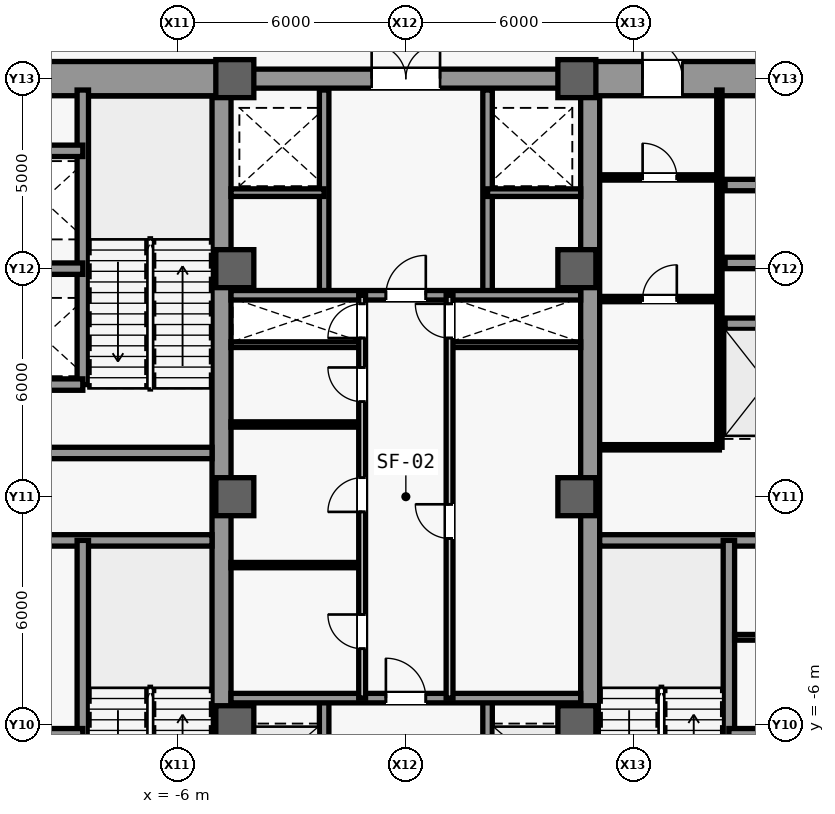
"""IFC4 building model, lengths in metres.
Left out: names, types, materials, properties, quantities, classifications, styles, units other than length and angle.
Written with IfcOpenShell. Run it as: python <this file> out.ifc"""

import sys

from ifc_helpers import new_model, si_unit, direction, frame, frame_2d, origin, origin_2d, place, context, subcontext, project, spatial, rectangle, extrude, source, transform, mapped, element, fill, save


model = new_model("IFC4")
c1 = context("Model", 3, precision=1e-05, world=origin(), true_north=direction((0.0, 1.0)))
c2 = subcontext(c1, "Body", "Model", "MODEL_VIEW")
j1 = project(units=[si_unit("LENGTHUNIT", "METRE"), si_unit("PLANEANGLEUNIT", "RADIAN")], contexts=[c1])
p1 = place(None, origin())
s1 = spatial("IfcSite", under=j1, at=p1, CompositionType="ELEMENT")
p2 = place(p1, origin())
s2 = spatial("IfcBuilding", under=s1, at=p2, CompositionType="ELEMENT")
p3 = place(p2, frame((0.0, 0.0, 12.0)))
s3 = spatial("IfcBuildingStorey", under=s2, at=p3, CompositionType="ELEMENT", Elevation=12.0)
m1 = source(origin(), c2, "Body", "SweptSolid", [
    extrude(rectangle(XDim=21.4, YDim=0.5, at=frame_2d((10.7, 0.0))), origin(), (0.0, 0.0, 1.0), 5.08),
])
for number, where, z_axis, x_axis in (
    (1, (-4.85, -10.7, 0.0), (0.0, 0.0, 1.0), (0.0, 1.0, 0.0)),
    (2, (4.85, -10.7, 0.0), (0.0, 0.0, 1.0), (0.0, 1.0, 0.0)),
):
    element("IfcWall", number, at=place(p3, frame(where, z_axis=z_axis, x_axis=x_axis)), inside=s3, PredefinedType="SHEAR", context=c2, shape_type="MappedRepresentation", body=[
        mapped(m1, transform((0.0, 0.0, 0.0), scale=1.0)),
    ])
m2 = source(origin(), c2, "Body", "SweptSolid", [
    extrude(rectangle(XDim=5.85, YDim=0.9, at=frame_2d((2.925, 0.0))), origin(), (0.0, 0.0, 1.0), 5.08),
])
p4 = place(p3, frame((-10.7, 11.0, 0.0), z_axis=(0.0, 0.0, 1.0), x_axis=(1.0, 0.0, 0.0)))
e3 = element("IfcWall", 3, at=p4, inside=s3, PredefinedType="SHEAR", context=c2, shape_type="MappedRepresentation", body=[
    mapped(m2, transform((0.0, 0.0, 0.0), scale=1.0)),
])
p5 = place(p3, frame((4.85, 11.0, 0.0), z_axis=(0.0, 0.0, 1.0), x_axis=(1.0, 0.0, 0.0)))
e4 = element("IfcWall", 4, at=p5, inside=s3, PredefinedType="SHEAR", context=c2, shape_type="MappedRepresentation", body=[
    mapped(m2, transform((0.0, 0.0, 0.0), scale=1.0)),
])
m3 = source(origin(), c2, "Body", "SweptSolid", [
    extrude(rectangle(XDim=1.05, YDim=2.2, at=frame_2d((0.525, 1.1))), frame((0.0, 0.46, 0.0), z_axis=(0.0, -1.0, 0.0), x_axis=(1.0, 0.0, 0.0)), (0.0, 0.0, 1.0), 0.92),
])
p6 = place(p5, frame((1.375, 0.0, 0.0)))
e5 = element("IfcOpeningElement", 5, at=p6, cuts=e4, PredefinedType="OPENING", context=c2, shape_type="MappedRepresentation", body=[
    mapped(m3, transform((0.0, 0.0, 0.0), scale=1.0)),
])
m4 = source(origin(), c2, "Body", "SweptSolid", [
    extrude(rectangle(XDim=5.6, YDim=0.3, at=frame_2d((2.8, 0.0))), origin(), (0.0, 0.0, 1.0), 5.08),
])
for number, where, z_axis, x_axis in (
    (6, (-10.7, -1.15, 0.0), (0.0, 0.0, 1.0), (1.0, 0.0, 0.0)),
    (7, (-10.7, 1.15, 0.0), (0.0, 0.0, 1.0), (1.0, 0.0, 0.0)),
    (8, (5.1, -1.15, 0.0), (0.0, 0.0, 1.0), (1.0, 0.0, 0.0)),
):
    element("IfcWall", number, at=place(p3, frame(where, z_axis=z_axis, x_axis=x_axis)), inside=s3, PredefinedType="SHEAR", context=c2, shape_type="MappedRepresentation", body=[
        mapped(m4, transform((0.0, 0.0, 0.0), scale=1.0)),
    ])
m5 = source(origin(), c2, "Body", "SweptSolid", [
    extrude(rectangle(XDim=9.2, YDim=0.5, at=frame_2d((4.6, 0.0))), origin(), (0.0, 0.0, 1.0), 5.08),
])
p7 = place(p3, frame((-4.6, 11.0, 0.0), z_axis=(0.0, 0.0, 1.0), x_axis=(1.0, 0.0, 0.0)))
e9 = element("IfcWall", 9, at=p7, inside=s3, PredefinedType="SHEAR", context=c2, shape_type="MappedRepresentation", body=[
    mapped(m5, transform((0.0, 0.0, 0.0), scale=1.0)),
])
m6 = source(origin(), c2, "Body", "SweptSolid", [
    extrude(rectangle(XDim=1.8, YDim=2.25, at=frame_2d((0.9, 1.125))), frame((0.0, 0.26, 0.0), z_axis=(0.0, -1.0, 0.0), x_axis=(1.0, 0.0, 0.0)), (0.0, 0.0, 1.0), 0.52),
])
p8 = place(p7, frame((3.7, 0.0, 0.0)))
e10 = element("IfcOpeningElement", 10, at=p8, cuts=e9, PredefinedType="OPENING", context=c2, shape_type="MappedRepresentation", body=[
    mapped(m6, transform((0.0, 0.0, 0.0), scale=1.0)),
])
m7 = source(origin(), c2, "Body", "SweptSolid", [
    extrude(rectangle(XDim=1.0, YDim=1.0, at=origin_2d()), origin(), (0.0, 0.0, 1.0), 5.4),
])
for number, where, z_axis, x_axis in (
    (11, (-4.5, -6.0, 0.0), (0.0, 0.0, 1.0), (1.0, 0.0, 0.0)),
    (12, (-4.5, 0.0, 0.0), (0.0, 0.0, 1.0), (1.0, 0.0, 0.0)),
    (13, (-4.5, 6.0, 0.0), (0.0, 0.0, 1.0), (1.0, 0.0, 0.0)),
    (14, (-4.5, 11.0, 0.0), (0.0, 0.0, 1.0), (1.0, 0.0, 0.0)),
    (15, (4.5, -6.0, 0.0), (0.0, 0.0, 1.0), (1.0, 0.0, 0.0)),
    (16, (4.5, 0.0, 0.0), (0.0, 0.0, 1.0), (1.0, 0.0, 0.0)),
    (17, (4.5, 6.0, 0.0), (0.0, 0.0, 1.0), (1.0, 0.0, 0.0)),
    (18, (4.5, 11.0, 0.0), (0.0, 0.0, 1.0), (1.0, 0.0, 0.0)),
):
    element("IfcColumn", number, at=place(p3, frame(where, z_axis=z_axis, x_axis=x_axis)), inside=s3, PredefinedType="COLUMN", context=c2, shape_type="MappedRepresentation", body=[
        mapped(m7, transform((0.0, 0.0, 0.0), scale=1.0)),
    ])
m8 = source(origin(), c2, "Body", "SweptSolid", [
    extrude(rectangle(XDim=7.8, YDim=0.3, at=frame_2d((3.9, 0.0))), origin(), (0.0, 0.0, 1.0), 5.08),
])
p9 = place(p3, frame((-8.5, -8.95, 0.0), z_axis=(0.0, 0.0, 1.0), x_axis=(0.0, 1.0, 0.0)))
e19 = element("IfcWall", 19, at=p9, inside=s3, PredefinedType="SHEAR", context=c2, shape_type="MappedRepresentation", body=[
    mapped(m8, transform((0.0, 0.0, 0.0), scale=1.0)),
])
m9 = source(origin(), c2, "Body", "SweptSolid", [
    extrude(rectangle(XDim=2.2, YDim=0.3, at=frame_2d((1.1, 0.0))), origin(), (0.0, 0.0, 1.0), 5.08),
])
p10 = place(p3, frame((-10.7, -6.25, 0.0), z_axis=(0.0, 0.0, 1.0), x_axis=(1.0, 0.0, 0.0)))
e20 = element("IfcWall", 20, at=p10, inside=s3, PredefinedType="SHEAR", context=c2, shape_type="MappedRepresentation", body=[
    mapped(m9, transform((0.0, 0.0, 0.0), scale=1.0)),
])
m10 = source(origin(), c2, "Body", "SweptSolid", [
    extrude(rectangle(XDim=7.75, YDim=0.3, at=frame_2d((3.875, 0.0))), origin(), (0.0, 0.0, 1.0), 5.08),
])
p11 = place(p3, frame((-8.5, 2.95, 0.0), z_axis=(0.0, 0.0, 1.0), x_axis=(0.0, 1.0, 0.0)))
e21 = element("IfcWall", 21, at=p11, inside=s3, PredefinedType="SHEAR", context=c2, shape_type="MappedRepresentation", body=[
    mapped(m10, transform((0.0, 0.0, 0.0), scale=1.0)),
])
for number, where, z_axis, x_axis in (
    (22, (-10.7, 2.95, 0.0), (0.0, 0.0, 1.0), (1.0, 0.0, 0.0)),
    (23, (-10.7, 6.0, 0.0), (0.0, 0.0, 1.0), (1.0, 0.0, 0.0)),
    (24, (-10.7, 9.1, 0.0), (0.0, 0.0, 1.0), (1.0, 0.0, 0.0)),
):
    element("IfcWall", number, at=place(p3, frame(where, z_axis=z_axis, x_axis=x_axis)), inside=s3, PredefinedType="SHEAR", context=c2, shape_type="MappedRepresentation", body=[
        mapped(m9, transform((0.0, 0.0, 0.0), scale=1.0)),
    ])
p12 = place(p3, frame((8.5, -8.95, 0.0), z_axis=(0.0, 0.0, 1.0), x_axis=(0.0, 1.0, 0.0)))
e25 = element("IfcWall", 25, at=p12, inside=s3, PredefinedType="SHEAR", context=c2, shape_type="MappedRepresentation", body=[
    mapped(m8, transform((0.0, 0.0, 0.0), scale=1.0)),
])
p13 = place(p3, frame((8.5, -6.25, 0.0), z_axis=(0.0, 0.0, 1.0), x_axis=(1.0, 0.0, 0.0)))
e26 = element("IfcWall", 26, at=p13, inside=s3, PredefinedType="SHEAR", context=c2, shape_type="MappedRepresentation", body=[
    mapped(m9, transform((0.0, 0.0, 0.0), scale=1.0)),
])
m11 = source(origin(), c2, "Body", "SweptSolid", [
    extrude(rectangle(XDim=2.3, YDim=0.3, at=frame_2d((1.15, 0.0))), origin(), (0.0, 0.0, 1.0), 5.08),
])
for number, where, z_axis, x_axis in (
    (27, (8.4, 4.55, 0.0), (0.0, 0.0, 1.0), (1.0, 0.0, 0.0)),
    (28, (8.4, 6.15, 0.0), (0.0, 0.0, 1.0), (1.0, 0.0, 0.0)),
    (29, (8.4, 8.2, 0.0), (0.0, 0.0, 1.0), (1.0, 0.0, 0.0)),
):
    element("IfcWall", number, at=place(p3, frame(where, z_axis=z_axis, x_axis=x_axis)), inside=s3, PredefinedType="SHEAR", context=c2, shape_type="MappedRepresentation", body=[
        mapped(m11, transform((0.0, 0.0, 0.0), scale=1.0)),
    ])
m12 = source(origin(), c2, "Body", "SweptSolid", [
    extrude(rectangle(XDim=2.05, YDim=0.15, at=frame_2d((1.025, 0.0))), origin(), (0.0, 0.0, 1.0), 5.08),
])
p14 = place(p3, frame((8.65, -3.7, 0.0), z_axis=(0.0, 0.0, 1.0), x_axis=(1.0, 0.0, 0.0)))
e30 = element("IfcWall", 30, at=p14, inside=s3, PredefinedType="PARTITIONING", context=c2, shape_type="MappedRepresentation", body=[
    mapped(m12, transform((0.0, 0.0, 0.0), scale=1.0)),
])
m13 = source(origin(), c2, "Body", "SweptSolid", [
    extrude(rectangle(XDim=9.4, YDim=0.14, at=frame_2d((4.7, 0.0))), origin(), (0.0, 0.0, 1.0), 5.08),
])
p15 = place(p3, frame((8.25, 1.3, 0.0), z_axis=(0.0, 0.0, 1.0), x_axis=(0.0, 1.0, 0.0)))
e31 = element("IfcWall", 31, at=p15, inside=s3, PredefinedType="PARTITIONING", context=c2, shape_type="MappedRepresentation", body=[
    mapped(m13, transform((0.0, 0.0, 0.0), scale=1.0)),
])
m14 = source(origin(), c2, "Body", "SweptSolid", [
    extrude(rectangle(XDim=3.15, YDim=0.14, at=frame_2d((1.575, 0.0))), origin(), (0.0, 0.0, 1.0), 5.08),
])
p16 = place(p3, frame((5.1, 1.3, 0.0), z_axis=(0.0, 0.0, 1.0), x_axis=(1.0, 0.0, 0.0)))
e32 = element("IfcWall", 32, at=p16, inside=s3, PredefinedType="PARTITIONING", context=c2, shape_type="MappedRepresentation", body=[
    mapped(m14, transform((0.0, 0.0, 0.0), scale=1.0)),
])
p17 = place(p3, frame((5.1, 8.4, 0.0), z_axis=(0.0, 0.0, 1.0), x_axis=(1.0, 0.0, 0.0)))
e33 = element("IfcWall", 33, at=p17, inside=s3, PredefinedType="PARTITIONING", context=c2, shape_type="MappedRepresentation", body=[
    mapped(m14, transform((0.0, 0.0, 0.0), scale=1.0)),
])
m15 = source(origin(), c2, "Body", "SweptSolid", [
    extrude(rectangle(XDim=0.9, YDim=2.15, at=frame_2d((0.45, 1.075))), frame((0.0, 0.08, 0.0), z_axis=(0.0, -1.0, 0.0), x_axis=(1.0, 0.0, 0.0)), (0.0, 0.0, 1.0), 0.16),
])
p18 = place(p17, frame((1.13, 0.0, 0.0)))
e34 = element("IfcOpeningElement", 34, at=p18, cuts=e33, PredefinedType="OPENING", context=c2, shape_type="MappedRepresentation", body=[
    mapped(m15, transform((0.0, 0.0, 0.0), scale=1.0)),
])
p19 = place(p3, frame((5.1, 5.2, 0.0), z_axis=(0.0, 0.0, 1.0), x_axis=(1.0, 0.0, 0.0)))
e35 = element("IfcWall", 35, at=p19, inside=s3, PredefinedType="PARTITIONING", context=c2, shape_type="MappedRepresentation", body=[
    mapped(m14, transform((0.0, 0.0, 0.0), scale=1.0)),
])
p20 = place(p19, frame((1.13, 0.0, 0.0)))
e36 = element("IfcOpeningElement", 36, at=p20, cuts=e35, PredefinedType="OPENING", context=c2, shape_type="MappedRepresentation", body=[
    mapped(m15, transform((0.0, 0.0, 0.0), scale=1.0)),
])
m16 = source(origin(), c2, "Body", "SweptSolid", [
    extrude(rectangle(XDim=3.45, YDim=0.15, at=frame_2d((1.725, 0.0))), origin(), (0.0, 0.0, 1.0), 5.08),
])
for number, where, z_axis, x_axis in (
    (37, (-4.6, 4.0, 0.0), (0.0, 0.0, 1.0), (1.0, 0.0, 0.0)),
    (38, (1.15, 4.0, 0.0), (0.0, 0.0, 1.0), (1.0, 0.0, 0.0)),
):
    element("IfcWall", number, at=place(p3, frame(where, z_axis=z_axis, x_axis=x_axis)), inside=s3, PredefinedType="PARTITIONING", context=c2, shape_type="MappedRepresentation", body=[
        mapped(m16, transform((0.0, 0.0, 0.0), scale=1.0)),
    ])
m17 = source(origin(), c2, "Body", "SweptSolid", [
    extrude(rectangle(XDim=5.4, YDim=0.25, at=frame_2d((2.7, 0.0))), origin(), (0.0, 0.0, 1.0), 5.08),
])
p21 = place(p3, frame((-2.15, -10.7, 0.0), z_axis=(0.0, 0.0, 1.0), x_axis=(0.0, 1.0, 0.0)))
e39 = element("IfcWall", 39, at=p21, inside=s3, PredefinedType="SHEAR", context=c2, shape_type="MappedRepresentation", body=[
    mapped(m17, transform((0.0, 0.0, 0.0), scale=1.0)),
])
m18 = source(origin(), c2, "Body", "SweptSolid", [
    extrude(rectangle(XDim=1.2, YDim=2.3, at=frame_2d((0.6, 1.15))), frame((0.0, 0.135, 0.0), z_axis=(0.0, -1.0, 0.0), x_axis=(1.0, 0.0, 0.0)), (0.0, 0.0, 1.0), 0.27),
])
p22 = place(p21, frame((0.9, 0.0, 0.0)))
e40 = element("IfcOpeningElement", 40, at=p22, cuts=e39, PredefinedType="OPENING", context=c2, shape_type="MappedRepresentation", body=[
    mapped(m18, transform((0.0, 0.0, 0.0), scale=1.0)),
])
p23 = place(p21, frame((3.2, 0.0, 0.0)))
e41 = element("IfcOpeningElement", 41, at=p23, cuts=e39, PredefinedType="OPENING", context=c2, shape_type="MappedRepresentation", body=[
    mapped(m18, transform((0.0, 0.0, 0.0), scale=1.0)),
])
p24 = place(p3, frame((2.15, -10.7, 0.0), z_axis=(0.0, 0.0, 1.0), x_axis=(0.0, 1.0, 0.0)))
e42 = element("IfcWall", 42, at=p24, inside=s3, PredefinedType="SHEAR", context=c2, shape_type="MappedRepresentation", body=[
    mapped(m17, transform((0.0, 0.0, 0.0), scale=1.0)),
])
p25 = place(p24, frame((0.9, 0.0, 0.0)))
e43 = element("IfcOpeningElement", 43, at=p25, cuts=e42, PredefinedType="OPENING", context=c2, shape_type="MappedRepresentation", body=[
    mapped(m18, transform((0.0, 0.0, 0.0), scale=1.0)),
])
p26 = place(p24, frame((3.2, 0.0, 0.0)))
e44 = element("IfcOpeningElement", 44, at=p26, cuts=e42, PredefinedType="OPENING", context=c2, shape_type="MappedRepresentation", body=[
    mapped(m18, transform((0.0, 0.0, 0.0), scale=1.0)),
])
m19 = source(origin(), c2, "Body", "SweptSolid", [
    extrude(rectangle(XDim=9.2, YDim=0.25, at=frame_2d((4.6, 0.0))), origin(), (0.0, 0.0, 1.0), 5.08),
])
p27 = place(p3, frame((-4.6, -5.3, 0.0), z_axis=(0.0, 0.0, 1.0), x_axis=(1.0, 0.0, 0.0)))
e45 = element("IfcWall", 45, at=p27, inside=s3, PredefinedType="SHEAR", context=c2, shape_type="MappedRepresentation", body=[
    mapped(m19, transform((0.0, 0.0, 0.0), scale=1.0)),
])
m20 = source(origin(), c2, "Body", "SweptSolid", [
    extrude(rectangle(XDim=1.05, YDim=2.2, at=frame_2d((0.525, 1.1))), frame((0.0, 0.135, 0.0), z_axis=(0.0, -1.0, 0.0), x_axis=(1.0, 0.0, 0.0)), (0.0, 0.0, 1.0), 0.27),
])
p28 = place(p27, frame((4.075, 0.0, 0.0)))
e46 = element("IfcOpeningElement", 46, at=p28, cuts=e45, PredefinedType="OPENING", context=c2, shape_type="MappedRepresentation", body=[
    mapped(m20, transform((0.0, 0.0, 0.0), scale=1.0)),
])
for number, where, z_axis, x_axis in (
    (47, (-2.15, 5.3, 0.0), (0.0, 0.0, 1.0), (0.0, 1.0, 0.0)),
    (48, (2.15, 5.3, 0.0), (0.0, 0.0, 1.0), (0.0, 1.0, 0.0)),
):
    element("IfcWall", number, at=place(p3, frame(where, z_axis=z_axis, x_axis=x_axis)), inside=s3, PredefinedType="SHEAR", context=c2, shape_type="MappedRepresentation", body=[
        mapped(m17, transform((0.0, 0.0, 0.0), scale=1.0)),
    ])
m21 = source(origin(), c2, "Body", "SweptSolid", [
    extrude(rectangle(XDim=2.45, YDim=0.2, at=frame_2d((1.225, 0.0))), origin(), (0.0, 0.0, 1.0), 5.08),
])
for number, where, z_axis, x_axis in (
    (49, (-4.6, 8.0, 0.0), (0.0, 0.0, 1.0), (1.0, 0.0, 0.0)),
    (50, (2.15, 8.0, 0.0), (0.0, 0.0, 1.0), (1.0, 0.0, 0.0)),
):
    element("IfcWall", number, at=place(p3, frame(where, z_axis=z_axis, x_axis=x_axis)), inside=s3, PredefinedType="SHEAR", context=c2, shape_type="MappedRepresentation", body=[
        mapped(m21, transform((0.0, 0.0, 0.0), scale=1.0)),
    ])
p29 = place(p3, frame((-4.6, 5.3, 0.0), z_axis=(0.0, 0.0, 1.0), x_axis=(1.0, 0.0, 0.0)))
e51 = element("IfcWall", 51, at=p29, inside=s3, PredefinedType="SHEAR", context=c2, shape_type="MappedRepresentation", body=[
    mapped(m19, transform((0.0, 0.0, 0.0), scale=1.0)),
])
p30 = place(p29, frame((4.075, 0.0, 0.0)))
e52 = element("IfcOpeningElement", 52, at=p30, cuts=e51, PredefinedType="OPENING", context=c2, shape_type="MappedRepresentation", body=[
    mapped(m20, transform((0.0, 0.0, 0.0), scale=1.0)),
])
m22 = source(origin(), c2, "Body", "SweptSolid", [
    extrude(rectangle(XDim=3.45, YDim=0.14, at=frame_2d((1.725, 0.0))), origin(), (0.0, 0.0, 1.0), 5.08),
])
for number, where, z_axis, x_axis in (
    (53, (-4.6, -1.8, 0.0), (0.0, 0.0, 1.0), (1.0, 0.0, 0.0)),
    (54, (-4.6, 1.9, 0.0), (0.0, 0.0, 1.0), (1.0, 0.0, 0.0)),
):
    element("IfcWall", number, at=place(p3, frame(where, z_axis=z_axis, x_axis=x_axis)), inside=s3, PredefinedType="PARTITIONING", context=c2, shape_type="MappedRepresentation", body=[
        mapped(m22, transform((0.0, 0.0, 0.0), scale=1.0)),
    ])
m23 = source(origin(), c2, "Body", "SweptSolid", [
    extrude(rectangle(XDim=10.6, YDim=0.18, at=frame_2d((5.3, 0.0))), origin(), (0.0, 0.0, 1.0), 5.08),
])
p31 = place(p3, frame((-1.15, -5.3, 0.0), z_axis=(0.0, 0.0, 1.0), x_axis=(0.0, 1.0, 0.0)))
e55 = element("IfcWall", 55, at=p31, inside=s3, PredefinedType="PARTITIONING", context=c2, shape_type="MappedRepresentation", body=[
    mapped(m23, transform((0.0, 0.0, 0.0), scale=1.0)),
])
m24 = source(origin(), c2, "Body", "SweptSolid", [
    extrude(rectangle(XDim=0.9, YDim=2.15, at=frame_2d((0.45, 1.075))), frame((0.0, 0.1, 0.0), z_axis=(0.0, -1.0, 0.0), x_axis=(1.0, 0.0, 0.0)), (0.0, 0.0, 1.0), 0.2),
])
p32 = place(p31, frame((1.3, 0.0, 0.0)))
e56 = element("IfcOpeningElement", 56, at=p32, cuts=e55, PredefinedType="OPENING", context=c2, shape_type="MappedRepresentation", body=[
    mapped(m24, transform((0.0, 0.0, 0.0), scale=1.0)),
])
p33 = place(p31, frame((4.9, 0.0, 0.0)))
e57 = element("IfcOpeningElement", 57, at=p33, cuts=e55, PredefinedType="OPENING", context=c2, shape_type="MappedRepresentation", body=[
    mapped(m24, transform((0.0, 0.0, 0.0), scale=1.0)),
])
p34 = place(p31, frame((7.8, 0.0, 0.0)))
e58 = element("IfcOpeningElement", 58, at=p34, cuts=e55, PredefinedType="OPENING", context=c2, shape_type="MappedRepresentation", body=[
    mapped(m24, transform((0.0, 0.0, 0.0), scale=1.0)),
])
p35 = place(p31, frame((9.475, 0.0, 0.0)))
e59 = element("IfcOpeningElement", 59, at=p35, cuts=e55, PredefinedType="OPENING", context=c2, shape_type="MappedRepresentation", body=[
    mapped(m24, transform((0.0, 0.0, 0.0), scale=1.0)),
])
p36 = place(p3, frame((1.15, -5.3, 0.0), z_axis=(0.0, 0.0, 1.0), x_axis=(0.0, 1.0, 0.0)))
e60 = element("IfcWall", 60, at=p36, inside=s3, PredefinedType="PARTITIONING", context=c2, shape_type="MappedRepresentation", body=[
    mapped(m23, transform((0.0, 0.0, 0.0), scale=1.0)),
])
p37 = place(p36, frame((4.2, 0.0, 0.0)))
e61 = element("IfcOpeningElement", 61, at=p37, cuts=e60, PredefinedType="OPENING", context=c2, shape_type="MappedRepresentation", body=[
    mapped(m24, transform((0.0, 0.0, 0.0), scale=1.0)),
])
p38 = place(p36, frame((9.475, 0.0, 0.0)))
e62 = element("IfcOpeningElement", 62, at=p38, cuts=e60, PredefinedType="OPENING", context=c2, shape_type="MappedRepresentation", body=[
    mapped(m24, transform((0.0, 0.0, 0.0), scale=1.0)),
])
m25 = source(origin(), c2, "Body", "SweptSolid", [
    extrude(rectangle(XDim=1.05, YDim=2.2, at=frame_2d((0.525, 1.1))), frame((0.0, 0.025, 0.0), z_axis=(0.0, -1.0, 0.0), x_axis=(1.0, 0.0, 0.0)), (0.0, 0.0, 1.0), 0.05),
])
p39 = place(p6, origin())
e63 = element("IfcDoor", 63, at=p39, inside=s3, OperationType="SINGLE_SWING_LEFT", PredefinedType="DOOR", context=c2, shape_type="MappedRepresentation", body=[
    mapped(m25, transform((0.0, 0.0, 0.0), scale=1.0)),
])
fill(e5, e63)
m26 = source(origin(), c2, "Body", "SweptSolid", [
    extrude(rectangle(XDim=0.9, YDim=2.15, at=frame_2d((0.45, 1.075))), frame((0.0, 0.025, 0.0), z_axis=(0.0, -1.0, 0.0), x_axis=(1.0, 0.0, 0.0)), (0.0, 0.0, 1.0), 0.05),
])
p40 = place(p18, origin())
e64 = element("IfcDoor", 64, at=p40, inside=s3, OperationType="SINGLE_SWING_LEFT", PredefinedType="DOOR", context=c2, shape_type="MappedRepresentation", body=[
    mapped(m26, transform((0.0, 0.0, 0.0), scale=1.0)),
])
fill(e34, e64)
p41 = place(p20, origin())
e65 = element("IfcDoor", 65, at=p41, inside=s3, OperationType="SINGLE_SWING_RIGHT", PredefinedType="DOOR", context=c2, shape_type="MappedRepresentation", body=[
    mapped(m26, transform((0.0, 0.0, 0.0), scale=1.0)),
])
fill(e36, e65)
p42 = place(p28, origin())
e66 = element("IfcDoor", 66, at=p42, inside=s3, OperationType="SINGLE_SWING_LEFT", PredefinedType="DOOR", context=c2, shape_type="MappedRepresentation", body=[
    mapped(m25, transform((0.0, 0.0, 0.0), scale=1.0)),
])
fill(e46, e66)
p43 = place(p30, origin())
e67 = element("IfcDoor", 67, at=p43, inside=s3, OperationType="SINGLE_SWING_RIGHT", PredefinedType="DOOR", context=c2, shape_type="MappedRepresentation", body=[
    mapped(m25, transform((0.0, 0.0, 0.0), scale=1.0)),
])
fill(e52, e67)
m27 = source(origin(), c2, "Body", "SweptSolid", [
    extrude(rectangle(XDim=1.8, YDim=2.25, at=frame_2d((0.9, 1.125))), frame((0.0, 0.025, 0.0), z_axis=(0.0, -1.0, 0.0), x_axis=(1.0, 0.0, 0.0)), (0.0, 0.0, 1.0), 0.05),
])
p44 = place(p8, origin())
e68 = element("IfcDoor", 68, at=p44, inside=s3, OperationType="SINGLE_SWING_RIGHT", PredefinedType="DOOR", context=c2, shape_type="MappedRepresentation", body=[
    mapped(m27, transform((0.0, 0.0, 0.0), scale=1.0)),
])
fill(e10, e68)
p45 = place(p32, origin())
e69 = element("IfcDoor", 69, at=p45, inside=s3, OperationType="SINGLE_SWING_RIGHT", PredefinedType="DOOR", context=c2, shape_type="MappedRepresentation", body=[
    mapped(m26, transform((0.0, 0.0, 0.0), scale=1.0)),
])
fill(e56, e69)
p46 = place(p33, origin())
e70 = element("IfcDoor", 70, at=p46, inside=s3, OperationType="SINGLE_SWING_LEFT", PredefinedType="DOOR", context=c2, shape_type="MappedRepresentation", body=[
    mapped(m26, transform((0.0, 0.0, 0.0), scale=1.0)),
])
fill(e57, e70)
p47 = place(p34, origin())
e71 = element("IfcDoor", 71, at=p47, inside=s3, OperationType="SINGLE_SWING_RIGHT", PredefinedType="DOOR", context=c2, shape_type="MappedRepresentation", body=[
    mapped(m26, transform((0.0, 0.0, 0.0), scale=1.0)),
])
fill(e58, e71)
p48 = place(p37, origin())
e72 = element("IfcDoor", 72, at=p48, inside=s3, OperationType="SINGLE_SWING_RIGHT", PredefinedType="DOOR", context=c2, shape_type="MappedRepresentation", body=[
    mapped(m26, transform((0.0, 0.0, 0.0), scale=1.0)),
])
fill(e61, e72)
p49 = place(p35, origin())
e73 = element("IfcDoor", 73, at=p49, inside=s3, OperationType="SINGLE_SWING_LEFT", PredefinedType="DOOR", context=c2, shape_type="MappedRepresentation", body=[
    mapped(m26, transform((0.0, 0.0, 0.0), scale=1.0)),
])
fill(e59, e73)
p50 = place(p38, origin())
e74 = element("IfcDoor", 74, at=p50, inside=s3, OperationType="SINGLE_SWING_RIGHT", PredefinedType="DOOR", context=c2, shape_type="MappedRepresentation", body=[
    mapped(m26, transform((0.0, 0.0, 0.0), scale=1.0)),
])
fill(e62, e74)
save(model, sys.argv[1])
